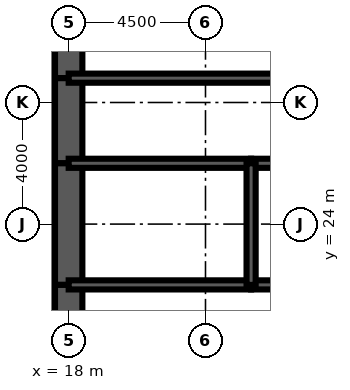
"""IFC4 building model, lengths in metres.
Left out: names, types, materials, properties, quantities, classifications, styles, units other than length and angle.
Written with IfcOpenShell. Run it as: python <this file> out.ifc"""

import sys

from ifc_helpers import new_model, si_unit, direction, frame, frame_2d, origin, place, context, subcontext, project, spatial, rectangle, extrude, element, fill, save


model = new_model("IFC4")
c1 = context("Model", 3, precision=1e-05, world=origin(), true_north=direction((0.0, 1.0)))
c2 = subcontext(c1, "Body", "Model", "MODEL_VIEW")
j1 = project(units=[si_unit("LENGTHUNIT", "METRE"), si_unit("PLANEANGLEUNIT", "RADIAN")], contexts=[c1])
p1 = place(None, origin())
s1 = spatial("IfcSite", under=j1, at=p1, CompositionType="ELEMENT")
p2 = place(p1, origin())
s2 = spatial("IfcBuilding", under=s1, at=p2, CompositionType="ELEMENT")
p3 = place(p2, frame((0.0, 0.0, 159.3)))
s3 = spatial("IfcBuildingStorey", under=s2, at=p3, CompositionType="ELEMENT", Elevation=159.3)
p4 = place(p3, frame((18.0, 32.0, 0.0), z_axis=(0.0, 0.0, 1.0), x_axis=(0.0, -1.0, 0.0)))
e1 = element("IfcWall", 1, at=p4, inside=s3, PredefinedType="SHEAR", context=c2, shape_type="SweptSolid", body=[
    extrude(rectangle(XDim=3.2, YDim=0.9, at=frame_2d((1.6, 0.0))), origin(), (0.0, 0.0, 1.0), 4.2),
])
p5 = place(p3, frame((18.0, 28.8, 0.0), z_axis=(0.0, 0.0, 1.0), x_axis=(0.0, -1.0, 0.0)))
e2 = element("IfcWall", 2, at=p5, inside=s3, PredefinedType="SHEAR", context=c2, shape_type="SweptSolid", body=[
    extrude(rectangle(XDim=2.8, YDim=0.9, at=frame_2d((1.4, 0.0))), origin(), (0.0, 0.0, 1.0), 4.2),
])
p6 = place(p5, frame((0.4, 0.0, 0.0)))
e3 = element("IfcOpeningElement", 3, at=p6, cuts=e2, PredefinedType="OPENING", context=c2, shape_type="SweptSolid", body=[
    extrude(rectangle(XDim=1.8, YDim=2.1, at=frame_2d((0.9, 1.05))), frame((0.0, 0.46, 0.0), z_axis=(0.0, -1.0, 0.0), x_axis=(1.0, 0.0, 0.0)), (0.0, 0.0, 1.0), 0.92),
])
p7 = place(p3, frame((18.0, 26.0, 0.0), z_axis=(0.0, 0.0, 1.0), x_axis=(0.0, -1.0, 0.0)))
e4 = element("IfcWall", 4, at=p7, inside=s3, PredefinedType="SHEAR", context=c2, shape_type="SweptSolid", body=[
    extrude(rectangle(XDim=4.0, YDim=0.9, at=frame_2d((2.0, 0.0))), origin(), (0.0, 0.0, 1.0), 4.2),
])
p8 = place(p3, frame((18.0, 22.0, 0.0), z_axis=(0.0, 0.0, 1.0), x_axis=(0.0, -1.0, 0.0)))
e5 = element("IfcWall", 5, at=p8, inside=s3, PredefinedType="SHEAR", context=c2, shape_type="SweptSolid", body=[
    extrude(rectangle(XDim=2.8, YDim=0.9, at=frame_2d((1.4, 0.0))), origin(), (0.0, 0.0, 1.0), 4.2),
])
p9 = place(p8, frame((0.6, 0.0, 0.0)))
e6 = element("IfcOpeningElement", 6, at=p9, cuts=e5, PredefinedType="OPENING", context=c2, shape_type="SweptSolid", body=[
    extrude(rectangle(XDim=1.8, YDim=2.1, at=frame_2d((0.9, 1.05))), frame((0.0, 0.46, 0.0), z_axis=(0.0, -1.0, 0.0), x_axis=(1.0, 0.0, 0.0)), (0.0, 0.0, 1.0), 0.92),
])
p10 = place(p3, frame((18.0, 28.8, 0.0), z_axis=(0.0, 0.0, 1.0), x_axis=(1.0, 0.0, 0.0)))
e7 = element("IfcWall", 7, at=p10, inside=s3, PredefinedType="SOLIDWALL", context=c2, shape_type="SweptSolid", body=[
    extrude(rectangle(XDim=9.0, YDim=0.3, at=frame_2d((4.5, 0.0))), origin(), (0.0, 0.0, 1.0), 4.2),
])
p11 = place(p10, frame((0.65, 0.0, 0.0)))
e8 = element("IfcOpeningElement", 8, at=p11, cuts=e7, PredefinedType="OPENING", context=c2, shape_type="SweptSolid", body=[
    extrude(rectangle(XDim=1.0, YDim=2.1, at=frame_2d((0.5, 1.05))), frame((0.0, 0.16, 0.0), z_axis=(0.0, -1.0, 0.0), x_axis=(1.0, 0.0, 0.0)), (0.0, 0.0, 1.0), 0.32),
])
p12 = place(p3, frame((18.0, 22.0, 0.0), z_axis=(0.0, 0.0, 1.0), x_axis=(1.0, 0.0, 0.0)))
e9 = element("IfcWall", 9, at=p12, inside=s3, PredefinedType="SOLIDWALL", context=c2, shape_type="SweptSolid", body=[
    extrude(rectangle(XDim=6.0, YDim=0.3, at=frame_2d((3.0, 0.0))), origin(), (0.0, 0.0, 1.0), 4.2),
])
p13 = place(p12, frame((4.4, 0.0, 0.0)))
e10 = element("IfcOpeningElement", 10, at=p13, cuts=e9, PredefinedType="OPENING", context=c2, shape_type="SweptSolid", body=[
    extrude(rectangle(XDim=1.0, YDim=2.1, at=frame_2d((0.5, 1.05))), frame((0.0, 0.16, 0.0), z_axis=(0.0, -1.0, 0.0), x_axis=(1.0, 0.0, 0.0)), (0.0, 0.0, 1.0), 0.32),
])
p14 = place(p12, frame((0.7, 0.0, 0.0)))
e11 = element("IfcOpeningElement", 11, at=p14, cuts=e9, PredefinedType="OPENING", context=c2, shape_type="SweptSolid", body=[
    extrude(rectangle(XDim=1.0, YDim=2.1, at=frame_2d((0.5, 1.05))), frame((0.0, 0.16, 0.0), z_axis=(0.0, -1.0, 0.0), x_axis=(1.0, 0.0, 0.0)), (0.0, 0.0, 1.0), 0.32),
])
p15 = place(p3, frame((24.0, 22.0, 0.0), z_axis=(0.0, 0.0, 1.0), x_axis=(1.0, 0.0, 0.0)))
e12 = element("IfcWall", 12, at=p15, inside=s3, PredefinedType="SOLIDWALL", context=c2, shape_type="SweptSolid", body=[
    extrude(rectangle(XDim=3.0, YDim=0.3, at=frame_2d((1.5, 0.0))), origin(), (0.0, 0.0, 1.0), 4.2),
])
p16 = place(p15, frame((1.0, 0.0, 0.0)))
e13 = element("IfcOpeningElement", 13, at=p16, cuts=e12, PredefinedType="OPENING", context=c2, shape_type="SweptSolid", body=[
    extrude(rectangle(XDim=1.0, YDim=2.1, at=frame_2d((0.5, 1.05))), frame((0.0, 0.16, 0.0), z_axis=(0.0, -1.0, 0.0), x_axis=(1.0, 0.0, 0.0)), (0.0, 0.0, 1.0), 0.32),
])
p17 = place(p3, frame((18.0, 26.0, 0.0), z_axis=(0.0, 0.0, 1.0), x_axis=(1.0, 0.0, 0.0)))
e14 = element("IfcWall", 14, at=p17, inside=s3, PredefinedType="SOLIDWALL", context=c2, shape_type="SweptSolid", body=[
    extrude(rectangle(XDim=6.0, YDim=0.3, at=frame_2d((3.0, 0.0))), origin(), (0.0, 0.0, 1.0), 4.2),
])
p18 = place(p3, frame((24.0, 26.0, 0.0), z_axis=(0.0, 0.0, 1.0), x_axis=(1.0, 0.0, 0.0)))
e15 = element("IfcWall", 15, at=p18, inside=s3, PredefinedType="SOLIDWALL", context=c2, shape_type="SweptSolid", body=[
    extrude(rectangle(XDim=3.0, YDim=0.3, at=frame_2d((1.5, 0.0))), origin(), (0.0, 0.0, 1.0), 4.2),
])
p19 = place(p3, frame((24.0, 22.0, 0.0), z_axis=(0.0, 0.0, 1.0), x_axis=(0.0, 1.0, 0.0)))
e16 = element("IfcWall", 16, at=p19, inside=s3, PredefinedType="SOLIDWALL", context=c2, shape_type="SweptSolid", body=[
    extrude(rectangle(XDim=4.0, YDim=0.3, at=frame_2d((2.0, 0.0))), origin(), (0.0, 0.0, 1.0), 4.2),
])
p20 = place(p3, frame((20.025, 22.15, 0.0), z_axis=(0.0, 0.0, 1.0), x_axis=(0.0, 1.0, 0.0)))
e17 = element("IfcWall", 17, at=p20, inside=s3, PredefinedType="PARTITIONING", context=c2, shape_type="SweptSolid", body=[
    extrude(rectangle(XDim=3.7, YDim=0.15, at=frame_2d((1.85, 0.0))), origin(), (0.0, 0.0, 1.0), 3.0),
])
p21 = place(p3, frame((23.7, 26.15, 0.0), z_axis=(0.0, 0.0, 1.0), x_axis=(0.0, 1.0, 0.0)))
e18 = element("IfcWall", 18, at=p21, inside=s3, PredefinedType="PARTITIONING", context=c2, shape_type="SweptSolid", body=[
    extrude(rectangle(XDim=2.5, YDim=0.15, at=frame_2d((1.25, 0.0))), origin(), (0.0, 0.0, 1.0), 3.0),
])
p22 = place(p21, frame((0.35, 0.0, 0.0)))
e19 = element("IfcOpeningElement", 19, at=p22, cuts=e18, PredefinedType="OPENING", context=c2, shape_type="SweptSolid", body=[
    extrude(rectangle(XDim=1.0, YDim=2.1, at=frame_2d((0.5, 1.05))), frame((0.0, 0.085, 0.0), z_axis=(0.0, -1.0, 0.0), x_axis=(1.0, 0.0, 0.0)), (0.0, 0.0, 1.0), 0.17),
])
p23 = place(p22, origin())
e20 = element("IfcDoor", 20, at=p23, inside=s3, OperationType="SINGLE_SWING_LEFT", PredefinedType="DOOR", context=c2, shape_type="SweptSolid", body=[
    extrude(rectangle(XDim=1.0, YDim=2.1, at=frame_2d((0.5, 1.05))), frame((0.0, 0.025, 0.0), z_axis=(0.0, -1.0, 0.0), x_axis=(1.0, 0.0, 0.0)), (0.0, 0.0, 1.0), 0.05),
])
fill(e19, e20)
p24 = place(p11, origin())
e21 = element("IfcDoor", 21, at=p24, inside=s3, OperationType="SINGLE_SWING_LEFT", PredefinedType="DOOR", context=c2, shape_type="SweptSolid", body=[
    extrude(rectangle(XDim=1.0, YDim=2.1, at=frame_2d((0.5, 1.05))), frame((0.0, 0.025, 0.0), z_axis=(0.0, -1.0, 0.0), x_axis=(1.0, 0.0, 0.0)), (0.0, 0.0, 1.0), 0.05),
])
fill(e8, e21)
p25 = place(p9, origin())
e22 = element("IfcDoor", 22, at=p25, inside=s3, OperationType="SINGLE_SWING_LEFT", PredefinedType="DOOR", context=c2, shape_type="SweptSolid", body=[
    extrude(rectangle(XDim=1.8, YDim=2.1, at=frame_2d((0.9, 1.05))), frame((0.0, 0.45, 0.0), z_axis=(0.0, -1.0, 0.0), x_axis=(1.0, 0.0, 0.0)), (0.0, 0.0, 1.0), 0.899),
])
fill(e6, e22)
p26 = place(p6, origin())
e23 = element("IfcDoor", 23, at=p26, inside=s3, OperationType="SINGLE_SWING_LEFT", PredefinedType="DOOR", context=c2, shape_type="SweptSolid", body=[
    extrude(rectangle(XDim=1.8, YDim=2.1, at=frame_2d((0.9, 1.05))), frame((0.0, 0.45, 0.0), z_axis=(0.0, -1.0, 0.0), x_axis=(1.0, 0.0, 0.0)), (0.0, 0.0, 1.0), 0.899),
])
fill(e3, e23)
p27 = place(p13, origin())
e24 = element("IfcDoor", 24, at=p27, inside=s3, OperationType="SINGLE_SWING_RIGHT", PredefinedType="DOOR", context=c2, shape_type="SweptSolid", body=[
    extrude(rectangle(XDim=1.0, YDim=2.1, at=frame_2d((0.5, 1.05))), frame((0.0, 0.025, 0.0), z_axis=(0.0, -1.0, 0.0), x_axis=(1.0, 0.0, 0.0)), (0.0, 0.0, 1.0), 0.05),
])
fill(e10, e24)
p28 = place(p14, origin())
e25 = element("IfcDoor", 25, at=p28, inside=s3, OperationType="SINGLE_SWING_LEFT", PredefinedType="DOOR", context=c2, shape_type="SweptSolid", body=[
    extrude(rectangle(XDim=1.0, YDim=2.1, at=frame_2d((0.5, 1.05))), frame((0.0, 0.025, 0.0), z_axis=(0.0, -1.0, 0.0), x_axis=(1.0, 0.0, 0.0)), (0.0, 0.0, 1.0), 0.05),
])
fill(e11, e25)
save(model, sys.argv[1])
